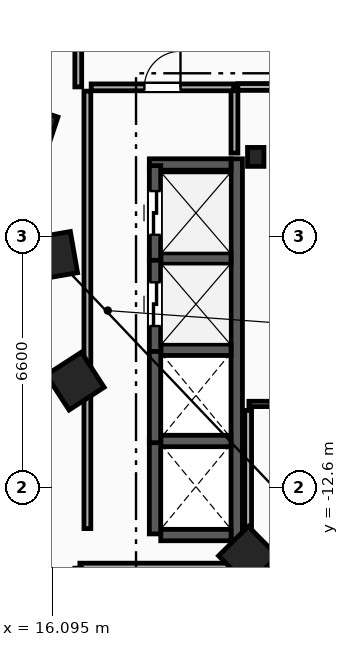
"""IFC4 building model, lengths in metres.
Left out: names, types, materials, properties, quantities, classifications, styles, units other than length and angle.
Written with IfcOpenShell. Run it as: python <this file> out.ifc"""

import sys

from ifc_helpers import new_model, si_unit, direction, frame, frame_2d, origin, origin_2d, place, context, subcontext, project, spatial, rectangle, i_section, extrude, element, fill, save


model = new_model("IFC4")
c1 = context("Model", 3, precision=1e-05, world=origin(), true_north=direction((0.0, 1.0)))
c2 = subcontext(c1, "Body", "Model", "MODEL_VIEW")
j1 = project(units=[si_unit("LENGTHUNIT", "METRE"), si_unit("PLANEANGLEUNIT", "RADIAN")], contexts=[c1])
p1 = place(None, origin())
s1 = spatial("IfcSite", under=j1, at=p1, CompositionType="ELEMENT")
p2 = place(p1, origin())
s2 = spatial("IfcBuilding", under=s1, at=p2, CompositionType="ELEMENT")
p3 = place(p2, frame((0.0, 0.0, 121.4)))
s3 = spatial("IfcBuildingStorey", under=s2, at=p3, CompositionType="ELEMENT", Elevation=121.4)
p4 = place(p3, frame((21.45, -3.9, 0.0), z_axis=(0.0, 0.0, 1.0), x_axis=(1.0, 0.0, 0.0)))
e1 = element("IfcColumn", 1, at=p4, inside=s3, PredefinedType="COLUMN", context=c2, shape_type="SweptSolid", body=[
    extrude(i_section(OverallWidth=0.432, OverallDepth=0.498, WebThickness=0.056, FlangeThickness=0.089, FilletRadius=0.018, at=origin_2d()), origin(), (0.0, 0.0, 1.0), 3.6),
])
for number, where, z_axis, x_axis in (
    (2, (15.55, -3.2, 0.0), (0.0, 0.0, 1.0), (-0.315, -0.949, 0.0)),
    (3, (16.125, -6.5, 0.0), (0.0, 0.0, 1.0), (0.172, -0.985, 0.0)),
    (4, (16.7, -9.8, 0.0), (0.0, 0.0, 1.0), (0.544, -0.839, 0.0)),
    (5, (21.25, -14.4, 0.0), (0.0, 0.0, 1.0), (0.703, -0.711, 0.0)),
):
    element("IfcColumn", number, at=place(p3, frame(where, z_axis=z_axis, x_axis=x_axis)), inside=s3, PredefinedType="COLUMN", context=c2, shape_type="SweptSolid", body=[
        extrude(rectangle(XDim=1.1, YDim=1.1, at=origin_2d()), origin(), (0.0, 0.0, 1.0), 3.6),
    ])
p5 = place(p3, frame((20.89, -3.8, 0.0), z_axis=(0.0, 0.0, 1.0), x_axis=(0.0, 1.0, 0.0)))
e6 = element("IfcWall", 6, at=p5, inside=s3, PredefinedType="PARTITIONING", context=c2, shape_type="SweptSolid", body=[
    extrude(rectangle(XDim=1.65, YDim=0.18, at=frame_2d((0.825, 0.0))), origin(), (0.0, 0.0, 1.0), 3.3),
])
p6 = place(p3, frame((20.98, -2.06, 0.0), z_axis=(0.0, 0.0, 1.0), x_axis=(1.0, 0.0, 0.0)))
e7 = element("IfcWall", 7, at=p6, inside=s3, PredefinedType="PARTITIONING", context=c2, shape_type="SweptSolid", body=[
    extrude(rectangle(XDim=3.0, YDim=0.18, at=frame_2d((1.5, 0.0))), origin(), (0.0, 0.0, 1.0), 3.3),
])
p7 = place(p6, frame((0.9, 0.0, 0.0)))
e8 = element("IfcOpeningElement", 8, at=p7, cuts=e7, PredefinedType="OPENING", context=c2, shape_type="SweptSolid", body=[
    extrude(rectangle(XDim=1.2, YDim=2.15, at=frame_2d((0.6, 1.075))), frame((0.0, 0.1, 0.0), z_axis=(0.0, -1.0, 0.0), x_axis=(1.0, 0.0, 0.0)), (0.0, 0.0, 1.0), 0.2),
])
p8 = place(p3, frame((20.95, -14.0, 0.0), z_axis=(0.0, 0.0, 1.0), x_axis=(0.0, 1.0, 0.0)))
e9 = element("IfcWall", 9, at=p8, inside=s3, PredefinedType="SHEAR", context=c2, shape_type="SweptSolid", body=[
    extrude(rectangle(XDim=10.05, YDim=0.3, at=frame_2d((5.025, 0.0))), origin(), (0.0, 0.0, 1.0), 3.3),
])
p9 = place(p3, frame((18.95, -13.85, 0.0), z_axis=(0.0, 0.0, 1.0), x_axis=(1.0, 0.0, 0.0)))
e10 = element("IfcWall", 10, at=p9, inside=s3, PredefinedType="SHEAR", context=c2, shape_type="SweptSolid", body=[
    extrude(rectangle(XDim=1.85, YDim=0.3, at=frame_2d((0.925, 0.0))), origin(), (0.0, 0.0, 1.0), 3.3),
])
p10 = place(p3, frame((18.65, -4.1, 0.0), z_axis=(0.0, 0.0, 1.0), x_axis=(1.0, 0.0, 0.0)))
e11 = element("IfcWall", 11, at=p10, inside=s3, PredefinedType="SHEAR", context=c2, shape_type="SweptSolid", body=[
    extrude(rectangle(XDim=2.15, YDim=0.3, at=frame_2d((1.075, 0.0))), origin(), (0.0, 0.0, 1.0), 3.3),
])
for number, where, z_axis, x_axis in (
    (12, (18.95, -11.375, 0.0), (0.0, 0.0, 1.0), (1.0, 0.0, 0.0)),
    (13, (18.95, -8.975, 0.0), (0.0, 0.0, 1.0), (1.0, 0.0, 0.0)),
    (14, (18.95, -6.575, 0.0), (0.0, 0.0, 1.0), (1.0, 0.0, 0.0)),
):
    element("IfcWall", number, at=place(p3, frame(where, z_axis=z_axis, x_axis=x_axis)), inside=s3, PredefinedType="SHEAR", context=c2, shape_type="SweptSolid", body=[
        extrude(rectangle(XDim=1.85, YDim=0.3, at=frame_2d((0.925, 0.0))), origin(), (0.0, 0.0, 1.0), 3.3),
    ])
for number, where, z_axis, x_axis in (
    (15, (18.8, -13.82, 0.0), (0.0, 0.0, 1.0), (0.0, 1.0, 0.0)),
    (16, (18.8, -11.42, 0.0), (0.0, 0.0, 1.0), (0.0, 1.0, 0.0)),
):
    element("IfcWall", number, at=place(p3, frame(where, z_axis=z_axis, x_axis=x_axis)), inside=s3, PredefinedType="SHEAR", context=c2, shape_type="SweptSolid", body=[
        extrude(rectangle(XDim=2.49, YDim=0.3, at=frame_2d((1.245, 0.0))), origin(), (0.0, 0.0, 1.0), 3.3),
    ])
p11 = place(p3, frame((18.8, -9.02, 0.0), z_axis=(0.0, 0.0, 1.0), x_axis=(0.0, 1.0, 0.0)))
e17 = element("IfcWall", 17, at=p11, inside=s3, PredefinedType="SHEAR", context=c2, shape_type="SweptSolid", body=[
    extrude(rectangle(XDim=2.49, YDim=0.3, at=frame_2d((1.245, 0.0))), origin(), (0.0, 0.0, 1.0), 3.3),
])
p12 = place(p11, frame((0.67, 0.0, 0.0)))
e18 = element("IfcOpeningElement", 18, at=p12, cuts=e17, PredefinedType="OPENING", context=c2, shape_type="SweptSolid", body=[
    extrude(rectangle(XDim=1.15, YDim=2.2, at=frame_2d((0.575, 1.1))), frame((0.0, 0.16, 0.0), z_axis=(0.0, -1.0, 0.0), x_axis=(1.0, 0.0, 0.0)), (0.0, 0.0, 1.0), 0.32),
])
p13 = place(p3, frame((18.8, -6.62, 0.0), z_axis=(0.0, 0.0, 1.0), x_axis=(0.0, 1.0, 0.0)))
e19 = element("IfcWall", 19, at=p13, inside=s3, PredefinedType="SHEAR", context=c2, shape_type="SweptSolid", body=[
    extrude(rectangle(XDim=2.49, YDim=0.3, at=frame_2d((1.245, 0.0))), origin(), (0.0, 0.0, 1.0), 3.3),
])
p14 = place(p13, frame((0.67, 0.0, 0.0)))
e20 = element("IfcOpeningElement", 20, at=p14, cuts=e19, PredefinedType="OPENING", context=c2, shape_type="SweptSolid", body=[
    extrude(rectangle(XDim=1.15, YDim=2.2, at=frame_2d((0.575, 1.1))), frame((0.0, 0.16, 0.0), z_axis=(0.0, -1.0, 0.0), x_axis=(1.0, 0.0, 0.0)), (0.0, 0.0, 1.0), 0.32),
])
p15 = place(p3, frame((17.02, -13.68, 0.0), z_axis=(0.0, 0.0, 1.0), x_axis=(0.0, 1.0, 0.0)))
e21 = element("IfcWall", 21, at=p15, inside=s3, PredefinedType="PARTITIONING", context=c2, shape_type="SweptSolid", body=[
    extrude(rectangle(XDim=11.51, YDim=0.18, at=frame_2d((5.755, 0.0))), origin(), (0.0, 0.0, 1.0), 3.3),
])
p16 = place(p3, frame((17.12, -2.07, 0.0), z_axis=(0.0, 0.0, 1.0), x_axis=(1.0, 0.0, 0.0)))
e22 = element("IfcWall", 22, at=p16, inside=s3, PredefinedType="PARTITIONING", context=c2, shape_type="SweptSolid", body=[
    extrude(rectangle(XDim=3.75, YDim=0.18, at=frame_2d((1.875, 0.0))), origin(), (0.0, 0.0, 1.0), 3.3),
])
p17 = place(p16, frame((1.4, 0.0, 0.0)))
e23 = element("IfcOpeningElement", 23, at=p17, cuts=e22, PredefinedType="OPENING", context=c2, shape_type="SweptSolid", body=[
    extrude(rectangle(XDim=0.95, YDim=2.1, at=frame_2d((0.475, 1.05))), frame((0.0, 0.1, 0.0), z_axis=(0.0, -1.0, 0.0), x_axis=(1.0, 0.0, 0.0)), (0.0, 0.0, 1.0), 0.2),
])
p18 = place(p3, frame((21.27, -10.4, 0.0), z_axis=(0.0, 0.0, 1.0), x_axis=(1.0, 0.0, 0.0)))
e24 = element("IfcWall", 24, at=p18, inside=s3, PredefinedType="PARTITIONING", context=c2, shape_type="SweptSolid", body=[
    extrude(rectangle(XDim=0.59, YDim=0.14, at=frame_2d((0.295, 0.0))), origin(), (0.0, 0.0, 1.0), 3.3),
])
p19 = place(p3, frame((21.25, -14.93, 0.0), z_axis=(0.0, 0.0, 1.0), x_axis=(0.0, 1.0, 0.0)))
e25 = element("IfcWall", 25, at=p19, inside=s3, PredefinedType="PARTITIONING", context=c2, shape_type="SweptSolid", body=[
    extrude(rectangle(XDim=4.36, YDim=0.18, at=frame_2d((2.18, 0.0))), origin(), (0.0, 0.0, 1.0), 3.3),
])
p20 = place(p3, frame((21.178, -14.68, 0.0), z_axis=(0.0, 0.0, 1.0), x_axis=(-1.0, 0.0, 0.0)))
e26 = element("IfcWall", 26, at=p20, inside=s3, PredefinedType="PARTITIONING", context=c2, shape_type="SweptSolid", body=[
    extrude(rectangle(XDim=4.357, YDim=0.18, at=frame_2d((2.178, 0.0))), origin(), (0.0, 0.0, 1.0), 3.3),
])
p21 = place(p3, frame((16.78, 0.329, 0.0), z_axis=(0.0, 0.0, 1.0), x_axis=(0.0, -1.0, 0.0)))
e27 = element("IfcWall", 27, at=p21, inside=s3, PredefinedType="PARTITIONING", context=c2, shape_type="SweptSolid", body=[
    extrude(rectangle(XDim=2.387, YDim=0.18, at=frame_2d((1.194, 0.0))), origin(), (0.0, 0.0, 1.0), 3.3),
])
p22 = place(p12, origin())
e28 = element("IfcDoor", 28, at=p22, inside=s3, OperationType="SLIDING_TO_LEFT", PredefinedType="TRAPDOOR", context=c2, shape_type="SweptSolid", body=[
    extrude(rectangle(XDim=1.15, YDim=2.2, at=frame_2d((0.575, 1.1))), frame((0.0, 0.025, 0.0), z_axis=(0.0, -1.0, 0.0), x_axis=(1.0, 0.0, 0.0)), (0.0, 0.0, 1.0), 0.05),
])
fill(e18, e28)
p23 = place(p14, origin())
e29 = element("IfcDoor", 29, at=p23, inside=s3, OperationType="SLIDING_TO_LEFT", PredefinedType="TRAPDOOR", context=c2, shape_type="SweptSolid", body=[
    extrude(rectangle(XDim=1.15, YDim=2.2, at=frame_2d((0.575, 1.1))), frame((0.0, 0.025, 0.0), z_axis=(0.0, -1.0, 0.0), x_axis=(1.0, 0.0, 0.0)), (0.0, 0.0, 1.0), 0.05),
])
fill(e20, e29)
p24 = place(p17, origin())
e30 = element("IfcDoor", 30, at=p24, inside=s3, OperationType="SINGLE_SWING_RIGHT", PredefinedType="DOOR", context=c2, shape_type="SweptSolid", body=[
    extrude(rectangle(XDim=0.95, YDim=2.1, at=frame_2d((0.475, 1.05))), frame((0.0, 0.025, 0.0), z_axis=(0.0, -1.0, 0.0), x_axis=(1.0, 0.0, 0.0)), (0.0, 0.0, 1.0), 0.05),
])
fill(e23, e30)
save(model, sys.argv[1])
